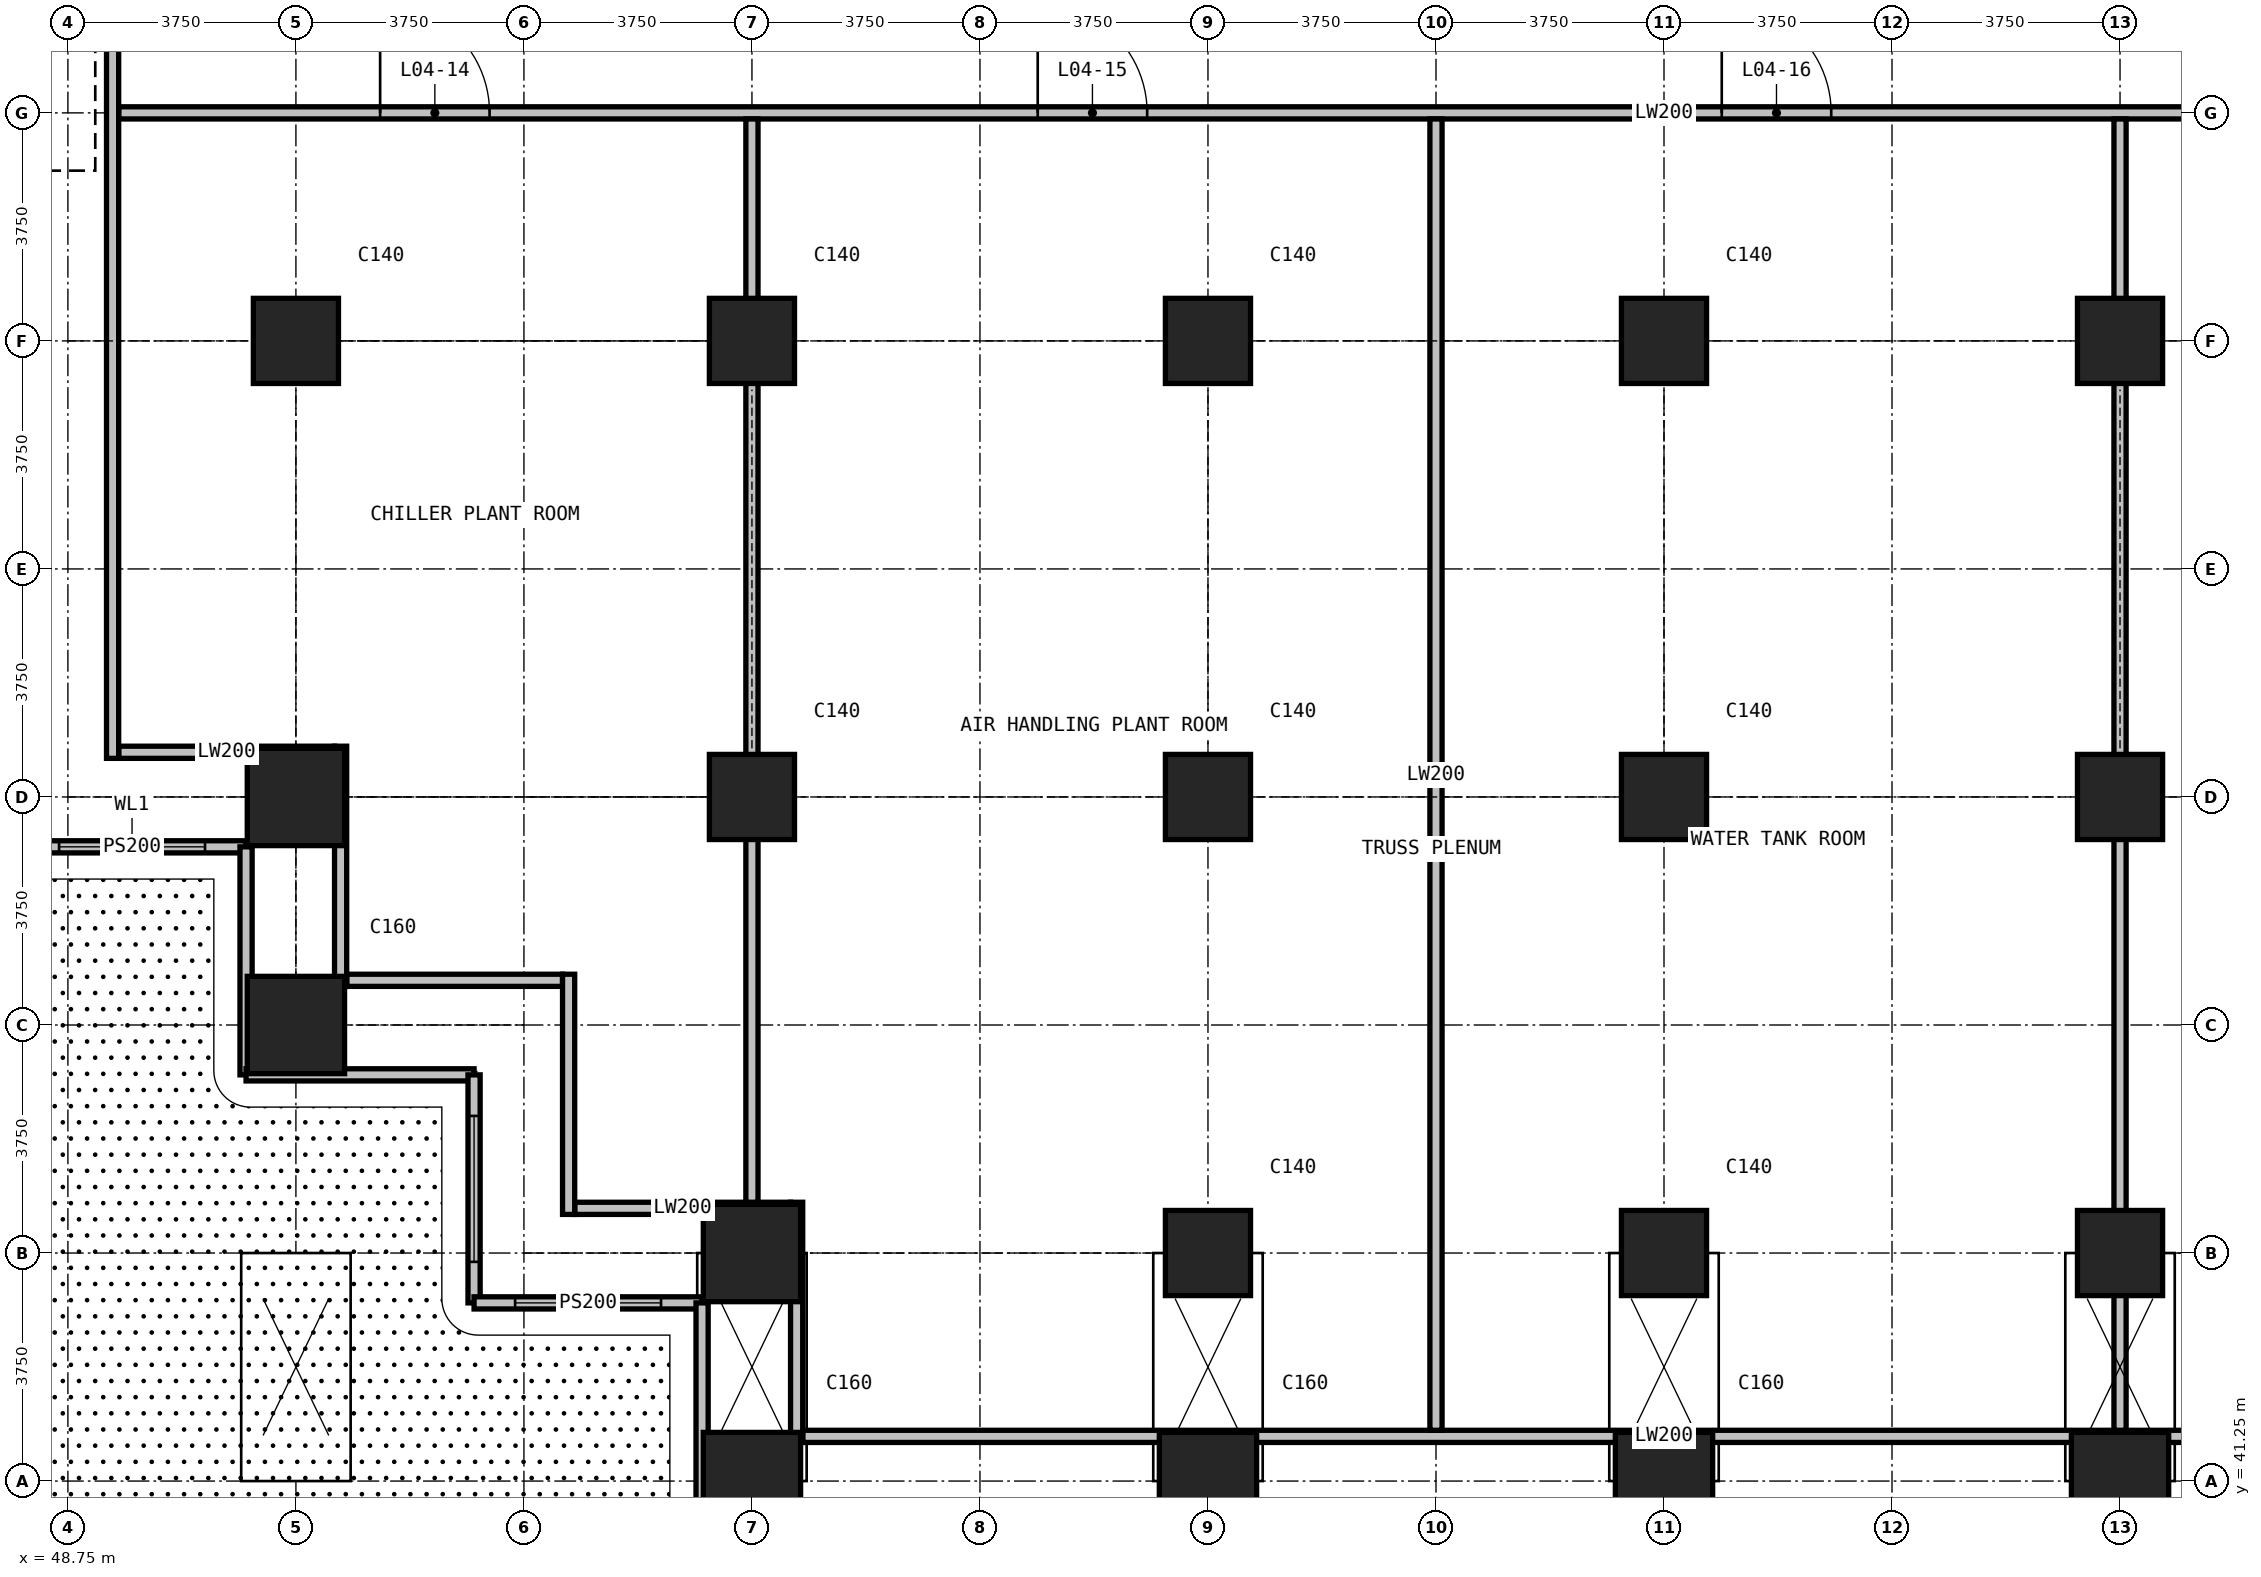
"""IFC4 building model, lengths in metres.
Left out: names, types, materials, properties, quantities, classifications, styles, units other than length and angle.
Written with IfcOpenShell. Run it as: python <this file> out.ifc"""

import sys

from ifc_helpers import new_model, si_unit, direction, frame, frame_2d, origin, origin_2d, place, context, subcontext, project, spatial, rectangle, extrude, element, fill, save


model = new_model("IFC4")
c1 = context("Model", 3, precision=1e-05, world=origin(), true_north=direction((0.0, 1.0)))
c2 = subcontext(c1, "Body", "Model", "MODEL_VIEW")
j1 = project(units=[si_unit("LENGTHUNIT", "METRE"), si_unit("PLANEANGLEUNIT", "RADIAN")], contexts=[c1])
p1 = place(None, origin())
s1 = spatial("IfcSite", under=j1, at=p1, CompositionType="ELEMENT")
p2 = place(p1, origin())
s2 = spatial("IfcBuilding", under=s1, at=p2, CompositionType="ELEMENT")
p3 = place(p2, frame((0.0, 0.0, 30.0)))
s3 = spatial("IfcBuildingStorey", under=s2, at=p3, CompositionType="ELEMENT", Elevation=30.0)
for number, where, z_axis, x_axis in (
    (1, (52.5, 48.75, 0.0), (0.0, 0.0, 1.0), (1.0, 0.0, 0.0)),
    (2, (52.5, 52.5, 0.0), (0.0, 0.0, 1.0), (1.0, 0.0, 0.0)),
):
    element("IfcColumn", number, at=place(p3, frame(where, z_axis=z_axis, x_axis=x_axis)), inside=s3, PredefinedType="COLUMN", context=c2, shape_type="SweptSolid", body=[
        extrude(rectangle(XDim=1.6, YDim=1.6, at=origin_2d()), origin(), (0.0, 0.0, 1.0), 5.0),
    ])
p4 = place(p3, frame((52.5, 60.0, 0.0), z_axis=(0.0, 0.0, 1.0), x_axis=(1.0, 0.0, 0.0)))
e3 = element("IfcColumn", 3, at=p4, inside=s3, PredefinedType="COLUMN", context=c2, shape_type="SweptSolid", body=[
    extrude(rectangle(XDim=1.4, YDim=1.4, at=origin_2d()), origin(), (0.0, 0.0, 1.0), 5.0),
])
for number, where, z_axis, x_axis in (
    (4, (60.0, 41.25, 0.0), (0.0, 0.0, 1.0), (1.0, 0.0, 0.0)),
    (5, (60.0, 45.0, 0.0), (0.0, 0.0, 1.0), (1.0, 0.0, 0.0)),
):
    element("IfcColumn", number, at=place(p3, frame(where, z_axis=z_axis, x_axis=x_axis)), inside=s3, PredefinedType="COLUMN", context=c2, shape_type="SweptSolid", body=[
        extrude(rectangle(XDim=1.6, YDim=1.6, at=origin_2d()), origin(), (0.0, 0.0, 1.0), 5.0),
    ])
for number, where, z_axis, x_axis in (
    (6, (60.0, 52.5, 0.0), (0.0, 0.0, 1.0), (1.0, 0.0, 0.0)),
    (7, (60.0, 60.0, 0.0), (0.0, 0.0, 1.0), (1.0, 0.0, 0.0)),
):
    element("IfcColumn", number, at=place(p3, frame(where, z_axis=z_axis, x_axis=x_axis)), inside=s3, PredefinedType="COLUMN", context=c2, shape_type="SweptSolid", body=[
        extrude(rectangle(XDim=1.4, YDim=1.4, at=origin_2d()), origin(), (0.0, 0.0, 1.0), 5.0),
    ])
p5 = place(p3, frame((67.5, 41.25, 0.0), z_axis=(0.0, 0.0, 1.0), x_axis=(1.0, 0.0, 0.0)))
e8 = element("IfcColumn", 8, at=p5, inside=s3, PredefinedType="COLUMN", context=c2, shape_type="SweptSolid", body=[
    extrude(rectangle(XDim=1.6, YDim=1.6, at=origin_2d()), origin(), (0.0, 0.0, 1.0), 5.0),
])
for number, where, z_axis, x_axis in (
    (9, (67.5, 45.0, 0.0), (0.0, 0.0, 1.0), (1.0, 0.0, 0.0)),
    (10, (67.5, 52.5, 0.0), (0.0, 0.0, 1.0), (1.0, 0.0, 0.0)),
    (11, (67.5, 60.0, 0.0), (0.0, 0.0, 1.0), (1.0, 0.0, 0.0)),
):
    element("IfcColumn", number, at=place(p3, frame(where, z_axis=z_axis, x_axis=x_axis)), inside=s3, PredefinedType="COLUMN", context=c2, shape_type="SweptSolid", body=[
        extrude(rectangle(XDim=1.4, YDim=1.4, at=origin_2d()), origin(), (0.0, 0.0, 1.0), 5.0),
    ])
p6 = place(p3, frame((75.0, 41.25, 0.0), z_axis=(0.0, 0.0, 1.0), x_axis=(1.0, 0.0, 0.0)))
e12 = element("IfcColumn", 12, at=p6, inside=s3, PredefinedType="COLUMN", context=c2, shape_type="SweptSolid", body=[
    extrude(rectangle(XDim=1.6, YDim=1.6, at=origin_2d()), origin(), (0.0, 0.0, 1.0), 5.0),
])
for number, where, z_axis, x_axis in (
    (13, (75.0, 45.0, 0.0), (0.0, 0.0, 1.0), (1.0, 0.0, 0.0)),
    (14, (75.0, 52.5, 0.0), (0.0, 0.0, 1.0), (1.0, 0.0, 0.0)),
    (15, (75.0, 60.0, 0.0), (0.0, 0.0, 1.0), (1.0, 0.0, 0.0)),
):
    element("IfcColumn", number, at=place(p3, frame(where, z_axis=z_axis, x_axis=x_axis)), inside=s3, PredefinedType="COLUMN", context=c2, shape_type="SweptSolid", body=[
        extrude(rectangle(XDim=1.4, YDim=1.4, at=origin_2d()), origin(), (0.0, 0.0, 1.0), 5.0),
    ])
p7 = place(p3, frame((82.5, 41.25, 0.0), z_axis=(0.0, 0.0, 1.0), x_axis=(1.0, 0.0, 0.0)))
e16 = element("IfcColumn", 16, at=p7, inside=s3, PredefinedType="COLUMN", context=c2, shape_type="SweptSolid", body=[
    extrude(rectangle(XDim=1.6, YDim=1.6, at=origin_2d()), origin(), (0.0, 0.0, 1.0), 5.0),
])
for number, where, z_axis, x_axis in (
    (17, (82.5, 45.0, 0.0), (0.0, 0.0, 1.0), (1.0, 0.0, 0.0)),
    (18, (82.5, 52.5, 0.0), (0.0, 0.0, 1.0), (1.0, 0.0, 0.0)),
    (19, (82.5, 60.0, 0.0), (0.0, 0.0, 1.0), (1.0, 0.0, 0.0)),
):
    element("IfcColumn", number, at=place(p3, frame(where, z_axis=z_axis, x_axis=x_axis)), inside=s3, PredefinedType="COLUMN", context=c2, shape_type="SweptSolid", body=[
        extrude(rectangle(XDim=1.4, YDim=1.4, at=origin_2d()), origin(), (0.0, 0.0, 1.0), 5.0),
    ])
p8 = place(p3, frame((47.93, 51.68, 0.0), z_axis=(0.0, 0.0, 1.0), x_axis=(1.0, 0.0, 0.0)))
e20 = element("IfcWall", 20, at=p8, inside=s3, PredefinedType="SOLIDWALL", context=c2, shape_type="SweptSolid", body=[
    extrude(rectangle(XDim=3.75, YDim=0.2, at=frame_2d((1.875, 0.0))), origin(), (0.0, 0.0, 1.0), 4.7),
])
p9 = place(p8, frame((0.675, 0.0, 1.0)))
e21 = element("IfcOpeningElement", 21, at=p9, cuts=e20, PredefinedType="OPENING", context=c2, shape_type="SweptSolid", body=[
    extrude(rectangle(XDim=2.4, YDim=3.0, at=frame_2d((1.2, 1.5))), frame((0.0, 0.11, 0.0), z_axis=(0.0, -1.0, 0.0), x_axis=(1.0, 0.0, 0.0)), (0.0, 0.0, 1.0), 0.22),
])
for number, where, z_axis, x_axis in (
    (22, (51.68, 47.93, 0.0), (0.0, 0.0, 1.0), (0.0, 1.0, 0.0)),
    (23, (51.68, 47.93, 0.0), (0.0, 0.0, 1.0), (1.0, 0.0, 0.0)),
):
    element("IfcWall", number, at=place(p3, frame(where, z_axis=z_axis, x_axis=x_axis)), inside=s3, PredefinedType="SOLIDWALL", context=c2, shape_type="SweptSolid", body=[
        extrude(rectangle(XDim=3.75, YDim=0.2, at=frame_2d((1.875, 0.0))), origin(), (0.0, 0.0, 1.0), 4.7),
    ])
p10 = place(p3, frame((55.43, 44.18, 0.0), z_axis=(0.0, 0.0, 1.0), x_axis=(0.0, 1.0, 0.0)))
e24 = element("IfcWall", 24, at=p10, inside=s3, PredefinedType="SOLIDWALL", context=c2, shape_type="SweptSolid", body=[
    extrude(rectangle(XDim=3.75, YDim=0.2, at=frame_2d((1.875, 0.0))), origin(), (0.0, 0.0, 1.0), 4.7),
])
p11 = place(p10, frame((0.675, 0.0, 1.0)))
e25 = element("IfcOpeningElement", 25, at=p11, cuts=e24, PredefinedType="OPENING", context=c2, shape_type="SweptSolid", body=[
    extrude(rectangle(XDim=2.4, YDim=3.0, at=frame_2d((1.2, 1.5))), frame((0.0, 0.11, 0.0), z_axis=(0.0, -1.0, 0.0), x_axis=(1.0, 0.0, 0.0)), (0.0, 0.0, 1.0), 0.22),
])
p12 = place(p3, frame((55.43, 44.18, 0.0), z_axis=(0.0, 0.0, 1.0), x_axis=(1.0, 0.0, 0.0)))
e26 = element("IfcWall", 26, at=p12, inside=s3, PredefinedType="SOLIDWALL", context=c2, shape_type="SweptSolid", body=[
    extrude(rectangle(XDim=3.75, YDim=0.2, at=frame_2d((1.875, 0.0))), origin(), (0.0, 0.0, 1.0), 4.7),
])
p13 = place(p12, frame((0.675, 0.0, 1.0)))
e27 = element("IfcOpeningElement", 27, at=p13, cuts=e26, PredefinedType="OPENING", context=c2, shape_type="SweptSolid", body=[
    extrude(rectangle(XDim=2.4, YDim=3.0, at=frame_2d((1.2, 1.5))), frame((0.0, 0.11, 0.0), z_axis=(0.0, -1.0, 0.0), x_axis=(1.0, 0.0, 0.0)), (0.0, 0.0, 1.0), 0.22),
])
p14 = place(p3, frame((59.18, 40.43, 0.0), z_axis=(0.0, 0.0, 1.0), x_axis=(0.0, 1.0, 0.0)))
e28 = element("IfcWall", 28, at=p14, inside=s3, PredefinedType="SOLIDWALL", context=c2, shape_type="SweptSolid", body=[
    extrude(rectangle(XDim=3.75, YDim=0.2, at=frame_2d((1.875, 0.0))), origin(), (0.0, 0.0, 1.0), 4.7),
])
p15 = place(p3, frame((60.835, 41.985, 0.0), z_axis=(0.0, 0.0, 1.0), x_axis=(1.0, 0.0, 0.0)))
e29 = element("IfcWall", 29, at=p15, inside=s3, PredefinedType="PARTITIONING", context=c2, shape_type="SweptSolid", body=[
    extrude(rectangle(XDim=28.33, YDim=0.2, at=frame_2d((14.165, 0.0))), origin(), (0.0, 0.0, 1.0), 4.7),
])
for number, where, z_axis, x_axis in (
    (30, (57.085, 45.735, 0.0), (0.0, 0.0, 1.0), (1.0, 0.0, 0.0)),
    (31, (53.335, 49.485, 0.0), (0.0, 0.0, 1.0), (1.0, 0.0, 0.0)),
    (32, (49.585, 53.235, 0.0), (0.0, 0.0, 1.0), (1.0, 0.0, 0.0)),
):
    element("IfcWall", number, at=place(p3, frame(where, z_axis=z_axis, x_axis=x_axis)), inside=s3, PredefinedType="PARTITIONING", context=c2, shape_type="SweptSolid", body=[
        extrude(rectangle(XDim=3.55, YDim=0.2, at=frame_2d((1.775, 0.0))), origin(), (0.0, 0.0, 1.0), 4.7),
    ])
p16 = place(p3, frame((49.585, 63.75, 0.0), z_axis=(0.0, 0.0, 1.0), x_axis=(1.0, 0.0, 0.0)))
e33 = element("IfcWall", 33, at=p16, inside=s3, PredefinedType="PARTITIONING", context=c2, shape_type="SweptSolid", body=[
    extrude(rectangle(XDim=50.83, YDim=0.2, at=frame_2d((25.415, 0.0))), origin(), (0.0, 0.0, 1.0), 4.7),
])
p17 = place(p16, frame((4.3, 0.0, 0.0)))
e34 = element("IfcOpeningElement", 34, at=p17, cuts=e33, PredefinedType="OPENING", context=c2, shape_type="SweptSolid", body=[
    extrude(rectangle(XDim=1.8, YDim=2.3, at=frame_2d((0.9, 1.15))), frame((0.0, 0.11, 0.0), z_axis=(0.0, -1.0, 0.0), x_axis=(1.0, 0.0, 0.0)), (0.0, 0.0, 1.0), 0.22),
])
p18 = place(p16, frame((15.115, 0.0, 0.0)))
e35 = element("IfcOpeningElement", 35, at=p18, cuts=e33, PredefinedType="OPENING", context=c2, shape_type="SweptSolid", body=[
    extrude(rectangle(XDim=1.8, YDim=2.3, at=frame_2d((0.9, 1.15))), frame((0.0, 0.11, 0.0), z_axis=(0.0, -1.0, 0.0), x_axis=(1.0, 0.0, 0.0)), (0.0, 0.0, 1.0), 0.22),
])
p19 = place(p16, frame((26.365, 0.0, 0.0)))
e36 = element("IfcOpeningElement", 36, at=p19, cuts=e33, PredefinedType="OPENING", context=c2, shape_type="SweptSolid", body=[
    extrude(rectangle(XDim=1.8, YDim=2.3, at=frame_2d((0.9, 1.15))), frame((0.0, 0.11, 0.0), z_axis=(0.0, -1.0, 0.0), x_axis=(1.0, 0.0, 0.0)), (0.0, 0.0, 1.0), 0.22),
])
p20 = place(p16, frame((37.665, 0.0, 0.0)))
e37 = element("IfcOpeningElement", 37, at=p20, cuts=e33, PredefinedType="OPENING", context=c2, shape_type="SweptSolid", body=[
    extrude(rectangle(XDim=1.8, YDim=2.3, at=frame_2d((0.9, 1.15))), frame((0.0, 0.11, 0.0), z_axis=(0.0, -1.0, 0.0), x_axis=(1.0, 0.0, 0.0)), (0.0, 0.0, 1.0), 0.22),
])
p21 = place(p16, frame((46.615, 0.0, 0.0)))
e38 = element("IfcOpeningElement", 38, at=p21, cuts=e33, PredefinedType="OPENING", context=c2, shape_type="SweptSolid", body=[
    extrude(rectangle(XDim=1.8, YDim=2.3, at=frame_2d((0.9, 1.15))), frame((0.0, 0.11, 0.0), z_axis=(0.0, -1.0, 0.0), x_axis=(1.0, 0.0, 0.0)), (0.0, 0.0, 1.0), 0.22),
])
p22 = place(p3, frame((49.485, 53.135, 0.0), z_axis=(0.0, 0.0, 1.0), x_axis=(0.0, 1.0, 0.0)))
e39 = element("IfcWall", 39, at=p22, inside=s3, PredefinedType="PARTITIONING", context=c2, shape_type="SweptSolid", body=[
    extrude(rectangle(XDim=28.73, YDim=0.2, at=frame_2d((14.365, 0.0))), origin(), (0.0, 0.0, 1.0), 4.7),
])
for number, where, z_axis, x_axis in (
    (40, (53.235, 49.385, 0.0), (0.0, 0.0, 1.0), (0.0, 1.0, 0.0)),
    (41, (56.985, 45.635, 0.0), (0.0, 0.0, 1.0), (0.0, 1.0, 0.0)),
):
    element("IfcWall", number, at=place(p3, frame(where, z_axis=z_axis, x_axis=x_axis)), inside=s3, PredefinedType="PARTITIONING", context=c2, shape_type="SweptSolid", body=[
        extrude(rectangle(XDim=3.95, YDim=0.2, at=frame_2d((1.975, 0.0))), origin(), (0.0, 0.0, 1.0), 4.7),
    ])
p23 = place(p3, frame((60.0, 45.835, 0.0), z_axis=(0.0, 0.0, 1.0), x_axis=(0.0, 1.0, 0.0)))
e42 = element("IfcWall", 42, at=p23, inside=s3, PredefinedType="PARTITIONING", context=c2, shape_type="SweptSolid", body=[
    extrude(rectangle(XDim=17.815, YDim=0.2, at=frame_2d((8.907, 0.0))), origin(), (0.0, 0.0, 1.0), 4.7),
])
p24 = place(p3, frame((60.735, 41.885, 0.0), z_axis=(0.0, 0.0, 1.0), x_axis=(0.0, 1.0, 0.0)))
e43 = element("IfcWall", 43, at=p24, inside=s3, PredefinedType="PARTITIONING", context=c2, shape_type="SweptSolid", body=[
    extrude(rectangle(XDim=3.95, YDim=0.2, at=frame_2d((1.975, 0.0))), origin(), (0.0, 0.0, 1.0), 4.7),
])
for number, where, z_axis, x_axis in (
    (44, (71.25, 42.085, 0.0), (0.0, 0.0, 1.0), (0.0, 1.0, 0.0)),
    (45, (82.5, 42.085, 0.0), (0.0, 0.0, 1.0), (0.0, 1.0, 0.0)),
):
    element("IfcWall", number, at=place(p3, frame(where, z_axis=z_axis, x_axis=x_axis)), inside=s3, PredefinedType="PARTITIONING", context=c2, shape_type="SweptSolid", body=[
        extrude(rectangle(XDim=21.565, YDim=0.2, at=frame_2d((10.782, 0.0))), origin(), (0.0, 0.0, 1.0), 4.7),
    ])
p25 = place(p9, origin())
e46 = element("IfcWindow", 46, at=p25, inside=s3, PartitioningType="SINGLE_PANEL", PredefinedType="USERDEFINED", context=c2, shape_type="SweptSolid", body=[
    extrude(rectangle(XDim=2.4, YDim=3.0, at=frame_2d((1.2, 1.5))), frame((0.0, 0.03, 0.0), z_axis=(0.0, -1.0, 0.0), x_axis=(1.0, 0.0, 0.0)), (0.0, 0.0, 1.0), 0.06),
])
fill(e21, e46)
p26 = place(p11, origin())
e47 = element("IfcWindow", 47, at=p26, inside=s3, PartitioningType="SINGLE_PANEL", PredefinedType="USERDEFINED", context=c2, shape_type="SweptSolid", body=[
    extrude(rectangle(XDim=2.4, YDim=3.0, at=frame_2d((1.2, 1.5))), frame((0.0, 0.03, 0.0), z_axis=(0.0, -1.0, 0.0), x_axis=(1.0, 0.0, 0.0)), (0.0, 0.0, 1.0), 0.06),
])
fill(e25, e47)
p27 = place(p13, origin())
e48 = element("IfcWindow", 48, at=p27, inside=s3, PartitioningType="SINGLE_PANEL", PredefinedType="USERDEFINED", context=c2, shape_type="SweptSolid", body=[
    extrude(rectangle(XDim=2.4, YDim=3.0, at=frame_2d((1.2, 1.5))), frame((0.0, 0.03, 0.0), z_axis=(0.0, -1.0, 0.0), x_axis=(1.0, 0.0, 0.0)), (0.0, 0.0, 1.0), 0.06),
])
fill(e27, e48)
p28 = place(p3, frame((0.0, 0.0, -0.35)))
p29 = place(p28, frame((48.0, 64.0, 0.0)))
p30 = place(p29, frame((0.0, 0.0, 0.3)))
e49 = element("IfcWindow", 49, at=p30, inside=s3, PartitioningType="SINGLE_PANEL", PredefinedType="SKYLIGHT", context=c2, shape_type="SweptSolid", body=[
    extrude(rectangle(XDim=2.4, YDim=2.4, at=origin_2d()), origin(), (0.0, 0.0, 1.0), 0.05),
])
p31 = place(p17, origin())
e50 = element("IfcDoor", 50, at=p31, inside=s3, OperationType="DOUBLE_DOOR_SINGLE_SWING", PredefinedType="DOOR", context=c2, shape_type="SweptSolid", body=[
    extrude(rectangle(XDim=1.8, YDim=2.3, at=frame_2d((0.9, 1.15))), frame((0.0, 0.025, 0.0), z_axis=(0.0, -1.0, 0.0), x_axis=(1.0, 0.0, 0.0)), (0.0, 0.0, 1.0), 0.05),
])
fill(e34, e50)
p32 = place(p18, origin())
e51 = element("IfcDoor", 51, at=p32, inside=s3, OperationType="DOUBLE_DOOR_SINGLE_SWING", PredefinedType="DOOR", context=c2, shape_type="SweptSolid", body=[
    extrude(rectangle(XDim=1.8, YDim=2.3, at=frame_2d((0.9, 1.15))), frame((0.0, 0.025, 0.0), z_axis=(0.0, -1.0, 0.0), x_axis=(1.0, 0.0, 0.0)), (0.0, 0.0, 1.0), 0.05),
])
fill(e35, e51)
p33 = place(p19, origin())
e52 = element("IfcDoor", 52, at=p33, inside=s3, OperationType="DOUBLE_DOOR_SINGLE_SWING", PredefinedType="DOOR", context=c2, shape_type="SweptSolid", body=[
    extrude(rectangle(XDim=1.8, YDim=2.3, at=frame_2d((0.9, 1.15))), frame((0.0, 0.025, 0.0), z_axis=(0.0, -1.0, 0.0), x_axis=(1.0, 0.0, 0.0)), (0.0, 0.0, 1.0), 0.05),
])
fill(e36, e52)
save(model, sys.argv[1])
